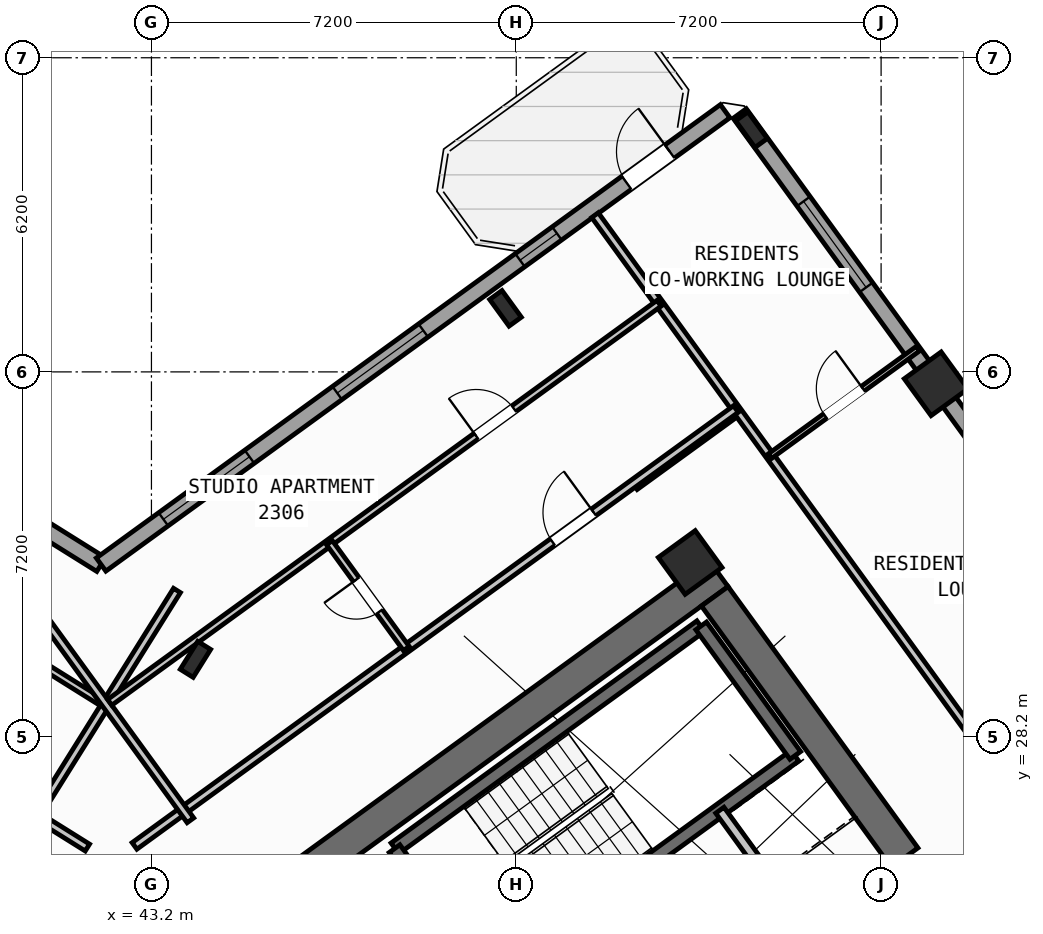
"""IFC4 building model, lengths in metres.
Left out: names, types, materials, properties, quantities, classifications, styles, units other than length and angle.
Written with IfcOpenShell. Run it as: python <this file> out.ifc"""

import sys

from ifc_helpers import new_model, si_unit, direction, frame, frame_2d, origin, origin_2d, place, context, subcontext, project, spatial, rectangle, hollow_rectangle, i_section, extrude, source, transform, mapped, element, fill, save


model = new_model("IFC4")
c1 = context("Model", 3, precision=1e-05, world=origin(), true_north=direction((0.0, 1.0)))
c2 = subcontext(c1, "Body", "Model", "MODEL_VIEW")
j1 = project(units=[si_unit("LENGTHUNIT", "METRE"), si_unit("PLANEANGLEUNIT", "RADIAN")], contexts=[c1])
p1 = place(None, origin())
s1 = spatial("IfcSite", under=j1, at=p1, CompositionType="ELEMENT")
p2 = place(p1, origin())
s2 = spatial("IfcBuilding", under=s1, at=p2, CompositionType="ELEMENT")
p3 = place(p2, frame((0.0, 0.0, 93.6)))
s3 = spatial("IfcBuildingStorey", under=s2, at=p3, CompositionType="ELEMENT", Elevation=93.6)
p4 = place(p3, frame((44.325, 24.113, 0.0), z_axis=(0.0, 0.0, 1.0), x_axis=(0.809012664862, 0.58779121131, 0.0)))
e1 = element("IfcWall", 1, at=p4, inside=s3, PredefinedType="SHEAR", context=c2, shape_type="SweptSolid", body=[
    extrude(rectangle(XDim=12.44, YDim=0.65, at=frame_2d((6.22, 0.0))), origin(), (0.0, 0.0, 1.0), 3.35),
])
p5 = place(p3, frame((58.064, 25.813, 0.0), z_axis=(0.0, 0.0, 1.0), x_axis=(-0.58777996584, 0.809020835181, 0.0)))
e2 = element("IfcWall", 2, at=p5, inside=s3, PredefinedType="SHEAR", context=c2, shape_type="SweptSolid", body=[
    extrude(rectangle(XDim=6.375, YDim=0.65, at=frame_2d((3.188, 0.0))), origin(), (0.0, 0.0, 1.0), 3.35),
])
m1 = source(origin(), c2, "Body", "SweptSolid", [
    extrude(i_section(OverallWidth=0.3, OverallDepth=0.65, WebThickness=0.016, FlangeThickness=0.031, at=origin_2d()), origin(), (0.0, 0.0, 1.0), 3.6),
])
p6 = place(p3, frame((44.068, 29.726, 0.0), z_axis=(0.0, 0.0, 1.0), x_axis=(-0.848048096156, 0.529919264233, 0.0)))
e3 = element("IfcColumn", 3, at=p6, inside=s3, PredefinedType="COLUMN", context=c2, shape_type="MappedRepresentation", body=[
    mapped(m1, transform((0.0, 0.0, 0.0), scale=1.0)),
])
m2 = source(origin(), c2, "Body", "SweptSolid", [
    extrude(hollow_rectangle(XDim=0.9, YDim=0.9, WallThickness=0.036, at=origin_2d()), origin(), (0.0, 0.0, 1.0), 3.6),
])
p7 = place(p3, frame((53.832, 31.638, 0.0), z_axis=(0.0, 0.0, 1.0), x_axis=(0.809016994375, 0.587785252292, 0.0)))
e4 = element("IfcColumn", 4, at=p7, inside=s3, PredefinedType="COLUMN", context=c2, shape_type="MappedRepresentation", body=[
    mapped(m2, transform((0.0, 0.0, 0.0), scale=1.0)),
])
p8 = place(p3, frame((50.188, 36.654, 0.0), z_axis=(0.0, 0.0, 1.0), x_axis=(0.809016994375, 0.587785252292, 0.0)))
e5 = element("IfcColumn", 5, at=p8, inside=s3, PredefinedType="COLUMN", context=c2, shape_type="MappedRepresentation", body=[
    mapped(m1, transform((0.0, 0.0, 0.0), scale=1.0)),
])
p9 = place(p3, frame((58.686, 35.165, 0.0), z_axis=(0.0, 0.0, 1.0), x_axis=(0.809016994375, 0.587785252292, 0.0)))
e6 = element("IfcColumn", 6, at=p9, inside=s3, PredefinedType="COLUMN", context=c2, shape_type="MappedRepresentation", body=[
    mapped(m2, transform((0.0, 0.0, 0.0), scale=1.0)),
])
p10 = place(p3, frame((55.042, 40.181, 0.0), z_axis=(0.0, 0.0, 1.0), x_axis=(0.809016994375, 0.587785252292, 0.0)))
e7 = element("IfcColumn", 7, at=p10, inside=s3, PredefinedType="COLUMN", context=c2, shape_type="MappedRepresentation", body=[
    mapped(m1, transform((0.0, 0.0, 0.0), scale=1.0)),
])
p11 = place(p3, frame((17.424, 47.083, 0.0), z_axis=(0.0, 0.0, 1.0), x_axis=(0.848049927979, -0.529916332693, 0.0)))
e8 = element("IfcWall", 8, at=p11, inside=s3, PredefinedType="STANDARD", context=c2, shape_type="SweptSolid", body=[
    extrude(rectangle(XDim=29.223, YDim=0.32, at=frame_2d((14.612, 0.0))), origin(), (0.0, 0.0, 1.0), 3.35),
])
p12 = place(p11, frame((3.745, 0.0, 0.0)))
e9 = element("IfcOpeningElement", 9, at=p12, cuts=e8, PredefinedType="OPENING", context=c2, shape_type="SweptSolid", body=[
    extrude(rectangle(XDim=1.05, YDim=2.15, at=frame_2d((0.525, 1.075))), frame((0.0, 0.17, 0.0), z_axis=(0.0, -1.0, 0.0), x_axis=(1.0, 0.0, 0.0)), (0.0, 0.0, 1.0), 0.34),
])
p13 = place(p11, frame((0.699, 0.0, 0.95)))
e10 = element("IfcOpeningElement", 10, at=p13, cuts=e8, PredefinedType="OPENING", context=c2, shape_type="SweptSolid", body=[
    extrude(rectangle(XDim=1.2, YDim=1.4, at=frame_2d((0.6, 0.7))), frame((0.0, 0.17, 0.0), z_axis=(0.0, -1.0, 0.0), x_axis=(1.0, 0.0, 0.0)), (0.0, 0.0, 1.0), 0.34),
])
p14 = place(p11, frame((6.951, 0.0, 1.0)))
e11 = element("IfcOpeningElement", 11, at=p14, cuts=e8, PredefinedType="OPENING", context=c2, shape_type="SweptSolid", body=[
    extrude(rectangle(XDim=0.9, YDim=1.25, at=frame_2d((0.45, 0.625))), frame((0.0, 0.17, 0.0), z_axis=(0.0, -1.0, 0.0), x_axis=(1.0, 0.0, 0.0)), (0.0, 0.0, 1.0), 0.34),
])
p15 = place(p11, frame((9.841, 0.0, 0.85)))
e12 = element("IfcOpeningElement", 12, at=p15, cuts=e8, PredefinedType="OPENING", context=c2, shape_type="SweptSolid", body=[
    extrude(rectangle(XDim=1.5, YDim=1.5, at=frame_2d((0.75, 0.75))), frame((0.0, 0.17, 0.0), z_axis=(0.0, -1.0, 0.0), x_axis=(1.0, 0.0, 0.0)), (0.0, 0.0, 1.0), 0.34),
])
p16 = place(p11, frame((13.889, 0.0, 0.95)))
e13 = element("IfcOpeningElement", 13, at=p16, cuts=e8, PredefinedType="OPENING", context=c2, shape_type="SweptSolid", body=[
    extrude(rectangle(XDim=1.2, YDim=1.4, at=frame_2d((0.6, 0.7))), frame((0.0, 0.17, 0.0), z_axis=(0.0, -1.0, 0.0), x_axis=(1.0, 0.0, 0.0)), (0.0, 0.0, 1.0), 0.34),
])
p17 = place(p11, frame((17.254, 0.0, 1.0)))
e14 = element("IfcOpeningElement", 14, at=p17, cuts=e8, PredefinedType="OPENING", context=c2, shape_type="SweptSolid", body=[
    extrude(rectangle(XDim=0.9, YDim=1.25, at=frame_2d((0.45, 0.625))), frame((0.0, 0.17, 0.0), z_axis=(0.0, -1.0, 0.0), x_axis=(1.0, 0.0, 0.0)), (0.0, 0.0, 1.0), 0.34),
])
p18 = place(p11, frame((20.764, 0.0, 0.8)))
e15 = element("IfcOpeningElement", 15, at=p18, cuts=e8, PredefinedType="OPENING", context=c2, shape_type="SweptSolid", body=[
    extrude(rectangle(XDim=2.1, YDim=1.55, at=frame_2d((1.05, 0.775))), frame((0.0, 0.17, 0.0), z_axis=(0.0, -1.0, 0.0), x_axis=(1.0, 0.0, 0.0)), (0.0, 0.0, 1.0), 0.34),
])
p19 = place(p11, frame((25.403, 0.0, 0.8)))
e16 = element("IfcOpeningElement", 16, at=p19, cuts=e8, PredefinedType="OPENING", context=c2, shape_type="SweptSolid", body=[
    extrude(rectangle(XDim=2.1, YDim=1.55, at=frame_2d((1.05, 0.775))), frame((0.0, 0.17, 0.0), z_axis=(0.0, -1.0, 0.0), x_axis=(1.0, 0.0, 0.0)), (0.0, 0.0, 1.0), 0.34),
])
p20 = place(p3, frame((42.207, 31.597, 0.0), z_axis=(0.0, 0.0, 1.0), x_axis=(0.809020333377, 0.587780656523, 0.0)))
e17 = element("IfcWall", 17, at=p20, inside=s3, PredefinedType="STANDARD", context=c2, shape_type="SweptSolid", body=[
    extrude(rectangle(XDim=15.223, YDim=0.32, at=frame_2d((7.611, 0.0))), origin(), (0.0, 0.0, 1.0), 3.35),
])
p21 = place(p20, frame((12.82, 0.0, 0.0)))
e18 = element("IfcOpeningElement", 18, at=p21, cuts=e17, PredefinedType="OPENING", context=c2, shape_type="SweptSolid", body=[
    extrude(rectangle(XDim=1.05, YDim=2.15, at=frame_2d((0.525, 1.075))), frame((0.0, 0.17, 0.0), z_axis=(0.0, -1.0, 0.0), x_axis=(1.0, 0.0, 0.0)), (0.0, 0.0, 1.0), 0.34),
])
p22 = place(p20, frame((1.52, 0.0, 0.8)))
e19 = element("IfcOpeningElement", 19, at=p22, cuts=e17, PredefinedType="OPENING", context=c2, shape_type="SweptSolid", body=[
    extrude(rectangle(XDim=2.1, YDim=1.55, at=frame_2d((1.05, 0.775))), frame((0.0, 0.17, 0.0), z_axis=(0.0, -1.0, 0.0), x_axis=(1.0, 0.0, 0.0)), (0.0, 0.0, 1.0), 0.34),
])
p23 = place(p20, frame((5.76, 0.0, 0.8)))
e20 = element("IfcOpeningElement", 20, at=p23, cuts=e17, PredefinedType="OPENING", context=c2, shape_type="SweptSolid", body=[
    extrude(rectangle(XDim=2.1, YDim=1.55, at=frame_2d((1.05, 0.775))), frame((0.0, 0.17, 0.0), z_axis=(0.0, -1.0, 0.0), x_axis=(1.0, 0.0, 0.0)), (0.0, 0.0, 1.0), 0.34),
])
p24 = place(p20, frame((10.219, 0.0, 1.0)))
e21 = element("IfcOpeningElement", 21, at=p24, cuts=e17, PredefinedType="OPENING", context=c2, shape_type="SweptSolid", body=[
    extrude(rectangle(XDim=0.9, YDim=1.25, at=frame_2d((0.45, 0.625))), frame((0.0, 0.17, 0.0), z_axis=(0.0, -1.0, 0.0), x_axis=(1.0, 0.0, 0.0)), (0.0, 0.0, 1.0), 0.34),
])
p25 = place(p3, frame((54.81, 40.5, 0.0), z_axis=(0.0, 0.0, 1.0), x_axis=(0.587783625747, -0.809018176127, 0.0)))
e22 = element("IfcWall", 22, at=p25, inside=s3, PredefinedType="STANDARD", context=c2, shape_type="SweptSolid", body=[
    extrude(rectangle(XDim=21.587, YDim=0.32, at=frame_2d((10.794, 0.0))), origin(), (0.0, 0.0, 1.0), 2.775),
])
p26 = place(p25, frame((2.143, 0.0, 0.8)))
e23 = element("IfcOpeningElement", 23, at=p26, cuts=e22, PredefinedType="OPENING", context=c2, shape_type="SweptSolid", body=[
    extrude(rectangle(XDim=2.1, YDim=1.55, at=frame_2d((1.05, 0.775))), frame((0.0, 0.17, 0.0), z_axis=(0.0, -1.0, 0.0), x_axis=(1.0, 0.0, 0.0)), (0.0, 0.0, 1.0), 0.34),
])
p27 = place(p25, frame((9.344, 0.0, 0.85)))
e24 = element("IfcOpeningElement", 24, at=p27, cuts=e22, PredefinedType="OPENING", context=c2, shape_type="SweptSolid", body=[
    extrude(rectangle(XDim=1.8, YDim=1.5, at=frame_2d((0.9, 0.75))), frame((0.0, 0.17, 0.0), z_axis=(0.0, -1.0, 0.0), x_axis=(1.0, 0.0, 0.0)), (0.0, 0.0, 1.0), 0.34),
])
p28 = place(p25, frame((18.309, 0.0, 0.85)))
e25 = element("IfcOpeningElement", 25, at=p28, cuts=e22, PredefinedType="OPENING", context=c2, shape_type="SweptSolid", body=[
    extrude(rectangle(XDim=1.5, YDim=1.5, at=frame_2d((0.75, 0.75))), frame((0.0, 0.17, 0.0), z_axis=(0.0, -1.0, 0.0), x_axis=(1.0, 0.0, 0.0)), (0.0, 0.0, 1.0), 0.34),
])
p29 = place(p3, frame((48.006, 25.996, 0.0), z_axis=(0.0, 0.0, 1.0), x_axis=(0.80901903764, 0.587782439969, 0.0)))
e26 = element("IfcWall", 26, at=p29, inside=s3, PredefinedType="SHEAR", context=c2, shape_type="SweptSolid", body=[
    extrude(rectangle(XDim=7.46, YDim=0.26, at=frame_2d((3.73, 0.0))), origin(), (0.0, 0.0, 1.0), 3.35),
])
p30 = place(p3, frame((49.863, 23.44, 0.0), z_axis=(0.0, 0.0, 1.0), x_axis=(0.809003474932, 0.587803859759, 0.0)))
e27 = element("IfcWall", 27, at=p30, inside=s3, PredefinedType="SHEAR", context=c2, shape_type="SweptSolid", body=[
    extrude(rectangle(XDim=7.46, YDim=0.26, at=frame_2d((3.73, 0.0))), origin(), (0.0, 0.0, 1.0), 3.35),
])
p31 = place(p30, frame((0.36, 0.0, 0.0)))
e28 = element("IfcOpeningElement", 28, at=p31, cuts=e27, PredefinedType="OPENING", context=c2, shape_type="SweptSolid", body=[
    extrude(rectangle(XDim=0.86, YDim=2.05, at=frame_2d((0.43, 1.025))), frame((0.0, 0.14, 0.0), z_axis=(0.0, -1.0, 0.0), x_axis=(1.0, 0.0, 0.0)), (0.0, 0.0, 1.0), 0.28),
])
p32 = place(p3, frame((49.855, 23.434, 0.0), z_axis=(0.0, 0.0, 1.0), x_axis=(-0.58776738483, 0.809029975545, 0.0)))
e29 = element("IfcWall", 29, at=p32, inside=s3, PredefinedType="SHEAR", context=c2, shape_type="SweptSolid", body=[
    extrude(rectangle(XDim=3.16, YDim=0.26, at=frame_2d((1.58, 0.0))), origin(), (0.0, 0.0, 1.0), 3.35),
])
p33 = place(p3, frame((55.906, 27.831, 0.0), z_axis=(0.0, 0.0, 1.0), x_axis=(-0.587804123638, 0.809003283204, 0.0)))
e30 = element("IfcWall", 30, at=p33, inside=s3, PredefinedType="SHEAR", context=c2, shape_type="SweptSolid", body=[
    extrude(rectangle(XDim=3.16, YDim=0.26, at=frame_2d((1.58, 0.0))), origin(), (0.0, 0.0, 1.0), 3.35),
])
p34 = place(p3, frame((56.111, 24.419, 0.0), z_axis=(0.0, 0.0, 1.0), x_axis=(-0.58777848983, 0.809021907548, 0.0)))
e31 = element("IfcWall", 31, at=p34, inside=s3, PredefinedType="STANDARD", context=c2, shape_type="SweptSolid", body=[
    extrude(rectangle(XDim=2.88, YDim=0.2, at=frame_2d((1.44, 0.0))), origin(), (0.0, 0.0, 1.0), 3.34),
])
p35 = place(p3, frame((41.936, 26.012, 0.0), z_axis=(0.0, 0.0, 1.0), x_axis=(-0.848051154596, 0.529914369676, 0.0)))
e32 = element("IfcWall", 32, at=p35, inside=s3, PredefinedType="PARTITIONING", context=c2, shape_type="SweptSolid", body=[
    extrude(rectangle(XDim=15.57, YDim=0.16, at=frame_2d((7.785, 0.0))), origin(), (0.0, 0.0, 1.0), 3.34),
])
p36 = place(p35, frame((10.83, 0.0, 0.0)))
e33 = element("IfcOpeningElement", 33, at=p36, cuts=e32, PredefinedType="OPENING", context=c2, shape_type="SweptSolid", body=[
    extrude(rectangle(XDim=1.0, YDim=2.1, at=frame_2d((0.5, 1.05))), frame((0.0, 0.09, 0.0), z_axis=(0.0, -1.0, 0.0), x_axis=(1.0, 0.0, 0.0)), (0.0, 0.0, 1.0), 0.18),
])
p37 = place(p3, frame((43.704, 31.086, 0.0), z_axis=(0.0, 0.0, 1.0), x_axis=(-0.529906828443, -0.848055866774, 0.0)))
e34 = element("IfcWall", 34, at=p37, inside=s3, PredefinedType="PARTITIONING", context=c2, shape_type="SweptSolid", body=[
    extrude(rectangle(XDim=5.48, YDim=0.16, at=frame_2d((2.74, 0.0))), origin(), (0.0, 0.0, 1.0), 3.34),
])
p38 = place(p3, frame((42.226, 28.873, 0.0), z_axis=(0.0, 0.0, 1.0), x_axis=(-0.848049134363, 0.529917602752, 0.0)))
e35 = element("IfcWall", 35, at=p38, inside=s3, PredefinedType="PLUMBINGWALL", context=c2, shape_type="SweptSolid", body=[
    extrude(rectangle(XDim=14.3, YDim=0.14, at=frame_2d((7.15, 0.0))), origin(), (0.0, 0.0, 1.0), 3.34),
])
p39 = place(p38, frame((9.57, 0.0, 0.0)))
e36 = element("IfcOpeningElement", 36, at=p39, cuts=e35, PredefinedType="OPENING", context=c2, shape_type="SweptSolid", body=[
    extrude(rectangle(XDim=0.92, YDim=2.08, at=frame_2d((0.46, 1.04))), frame((0.0, 0.08, 0.0), z_axis=(0.0, -1.0, 0.0), x_axis=(1.0, 0.0, 0.0)), (0.0, 0.0, 1.0), 0.16),
])
p40 = place(p3, frame((52.739, 33.143, 0.0), z_axis=(0.0, 0.0, 1.0), x_axis=(0.809000999347, 0.58780726693, 0.0)))
e37 = element("IfcWall", 37, at=p40, inside=s3, PredefinedType="PARTITIONING", context=c2, shape_type="SweptSolid", body=[
    extrude(rectangle(XDim=2.51, YDim=0.16, at=frame_2d((1.255, 0.0))), origin(), (0.0, 0.0, 1.0), 3.34),
])
p41 = place(p3, frame((60.829, 26.278, 0.0), z_axis=(0.0, 0.0, 1.0), x_axis=(-0.587777474174, 0.809022645451, 0.0)))
e38 = element("IfcWall", 38, at=p41, inside=s3, PredefinedType="PARTITIONING", context=c2, shape_type="SweptSolid", body=[
    extrude(rectangle(XDim=15.1, YDim=0.16, at=frame_2d((7.55, 0.0))), origin(), (0.0, 0.0, 1.0), 3.34),
])
p42 = place(p3, frame((55.409, 33.738, 0.0), z_axis=(0.0, 0.0, 1.0), x_axis=(0.809005039917, 0.58780170584, 0.0)))
e39 = element("IfcWall", 39, at=p42, inside=s3, PredefinedType="PARTITIONING", context=c2, shape_type="SweptSolid", body=[
    extrude(rectangle(XDim=3.61, YDim=0.11, at=frame_2d((1.805, 0.0))), origin(), (0.0, 0.0, 1.0), 3.34),
])
p43 = place(p42, frame((1.345, 0.0, 0.0)))
e40 = element("IfcOpeningElement", 40, at=p43, cuts=e39, PredefinedType="OPENING", context=c2, shape_type="SweptSolid", body=[
    extrude(rectangle(XDim=0.92, YDim=2.08, at=frame_2d((0.46, 1.04))), frame((0.0, 0.065, 0.0), z_axis=(0.0, -1.0, 0.0), x_axis=(1.0, 0.0, 0.0)), (0.0, 0.0, 1.0), 0.13),
])
p44 = place(p3, frame((42.866, 26.044, 0.0), z_axis=(0.0, 0.0, 1.0), x_axis=(0.809020254154, 0.587780765566, 0.0)))
e41 = element("IfcWall", 41, at=p44, inside=s3, PredefinedType="PARTITIONING", context=c2, shape_type="SweptSolid", body=[
    extrude(rectangle(XDim=14.67, YDim=0.16, at=frame_2d((7.335, 0.0))), origin(), (0.0, 0.0, 1.0), 3.34),
])
p45 = place(p44, frame((10.2, 0.0, 0.0)))
e42 = element("IfcOpeningElement", 42, at=p45, cuts=e41, PredefinedType="OPENING", context=c2, shape_type="SweptSolid", body=[
    extrude(rectangle(XDim=1.0, YDim=2.1, at=frame_2d((0.5, 1.05))), frame((0.0, 0.09, 0.0), z_axis=(0.0, -1.0, 0.0), x_axis=(1.0, 0.0, 0.0)), (0.0, 0.0, 1.0), 0.18),
])
p46 = place(p3, frame((43.969, 26.55, 0.0), z_axis=(0.0, 0.0, 1.0), x_axis=(-0.587776919386, 0.80902304852, 0.0)))
e43 = element("IfcWall", 43, at=p46, inside=s3, PredefinedType="PARTITIONING", context=c2, shape_type="SweptSolid", body=[
    extrude(rectangle(XDim=5.48, YDim=0.16, at=frame_2d((2.74, 0.0))), origin(), (0.0, 0.0, 1.0), 3.34),
])
p47 = place(p3, frame((42.377, 28.878, 0.0), z_axis=(0.0, 0.0, 1.0), x_axis=(0.809020411523, 0.587780548963, 0.0)))
e44 = element("IfcWall", 44, at=p47, inside=s3, PredefinedType="PLUMBINGWALL", context=c2, shape_type="SweptSolid", body=[
    extrude(rectangle(XDim=13.4, YDim=0.14, at=frame_2d((6.7, 0.0))), origin(), (0.0, 0.0, 1.0), 3.34),
])
p48 = place(p47, frame((8.94, 0.0, 0.0)))
e45 = element("IfcOpeningElement", 45, at=p48, cuts=e44, PredefinedType="OPENING", context=c2, shape_type="SweptSolid", body=[
    extrude(rectangle(XDim=0.92, YDim=2.08, at=frame_2d((0.46, 1.04))), frame((0.0, 0.08, 0.0), z_axis=(0.0, -1.0, 0.0), x_axis=(1.0, 0.0, 0.0)), (0.0, 0.0, 1.0), 0.16),
])
p49 = place(p3, frame((48.229, 29.941, 0.0), z_axis=(0.0, 0.0, 1.0), x_axis=(-0.587772116736, 0.809026537752, 0.0)))
e46 = element("IfcWall", 46, at=p49, inside=s3, PredefinedType="PLUMBINGWALL", context=c2, shape_type="SweptSolid", body=[
    extrude(rectangle(XDim=2.58, YDim=0.14, at=frame_2d((1.29, 0.0))), origin(), (0.0, 0.0, 1.0), 3.34),
])
p50 = place(p49, frame((0.9, 0.0, 0.0)))
e47 = element("IfcOpeningElement", 47, at=p50, cuts=e46, PredefinedType="OPENING", context=c2, shape_type="SweptSolid", body=[
    extrude(rectangle(XDim=0.78, YDim=2.05, at=frame_2d((0.39, 1.025))), frame((0.0, 0.08, 0.0), z_axis=(0.0, -1.0, 0.0), x_axis=(1.0, 0.0, 0.0)), (0.0, 0.0, 1.0), 0.16),
])
m3 = source(origin(), c2, "Body", "SweptSolid", [
    extrude(rectangle(XDim=1.05, YDim=2.15, at=frame_2d((0.525, 1.075))), frame((0.0, 0.025, 0.0), z_axis=(0.0, -1.0, 0.0), x_axis=(1.0, 0.0, 0.0)), (0.0, 0.0, 1.0), 0.05),
])
p51 = place(p21, origin())
e48 = element("IfcDoor", 48, at=p51, inside=s3, OperationType="SINGLE_SWING_RIGHT", PredefinedType="DOOR", context=c2, shape_type="MappedRepresentation", body=[
    mapped(m3, transform((0.0, 0.0, 0.0), scale=1.0)),
])
fill(e18, e48)
m4 = source(origin(), c2, "Body", "SweptSolid", [
    extrude(rectangle(XDim=2.1, YDim=1.55, at=frame_2d((1.05, 0.775))), frame((0.0, 0.03, 0.0), z_axis=(0.0, -1.0, 0.0), x_axis=(1.0, 0.0, 0.0)), (0.0, 0.0, 1.0), 0.06),
])
p52 = place(p22, origin())
e49 = element("IfcWindow", 49, at=p52, inside=s3, PartitioningType="SINGLE_PANEL", PredefinedType="WINDOW", context=c2, shape_type="MappedRepresentation", body=[
    mapped(m4, transform((0.0, 0.0, 0.0), scale=1.0)),
])
fill(e19, e49)
p53 = place(p23, origin())
e50 = element("IfcWindow", 50, at=p53, inside=s3, PartitioningType="SINGLE_PANEL", PredefinedType="WINDOW", context=c2, shape_type="MappedRepresentation", body=[
    mapped(m4, transform((0.0, 0.0, 0.0), scale=1.0)),
])
fill(e20, e50)
m5 = source(origin(), c2, "Body", "SweptSolid", [
    extrude(rectangle(XDim=0.9, YDim=1.25, at=frame_2d((0.45, 0.625))), frame((0.0, 0.03, 0.0), z_axis=(0.0, -1.0, 0.0), x_axis=(1.0, 0.0, 0.0)), (0.0, 0.0, 1.0), 0.06),
])
p54 = place(p24, origin())
e51 = element("IfcWindow", 51, at=p54, inside=s3, PartitioningType="SINGLE_PANEL", PredefinedType="WINDOW", context=c2, shape_type="MappedRepresentation", body=[
    mapped(m5, transform((0.0, 0.0, 0.0), scale=1.0)),
])
fill(e21, e51)
p55 = place(p26, origin())
e52 = element("IfcWindow", 52, at=p55, inside=s3, PartitioningType="SINGLE_PANEL", PredefinedType="WINDOW", context=c2, shape_type="MappedRepresentation", body=[
    mapped(m4, transform((0.0, 0.0, 0.0), scale=1.0)),
])
fill(e23, e52)
m6 = source(origin(), c2, "Body", "SweptSolid", [
    extrude(rectangle(XDim=0.92, YDim=2.08, at=frame_2d((0.46, 1.04))), frame((0.0, 0.025, 0.0), z_axis=(0.0, -1.0, 0.0), x_axis=(1.0, 0.0, 0.0)), (0.0, 0.0, 1.0), 0.05),
])
p56 = place(p43, origin())
e53 = element("IfcDoor", 53, at=p56, inside=s3, OperationType="SINGLE_SWING_RIGHT", PredefinedType="DOOR", context=c2, shape_type="MappedRepresentation", body=[
    mapped(m6, transform((0.0, 0.0, 0.0), scale=1.0)),
])
fill(e40, e53)
m7 = source(origin(), c2, "Body", "SweptSolid", [
    extrude(rectangle(XDim=1.0, YDim=2.1, at=frame_2d((0.5, 1.05))), frame((0.0, 0.025, 0.0), z_axis=(0.0, -1.0, 0.0), x_axis=(1.0, 0.0, 0.0)), (0.0, 0.0, 1.0), 0.05),
])
p57 = place(p45, origin())
e54 = element("IfcDoor", 54, at=p57, inside=s3, OperationType="SINGLE_SWING_RIGHT", PredefinedType="DOOR", context=c2, shape_type="MappedRepresentation", body=[
    mapped(m7, transform((0.0, 0.0, 0.0), scale=1.0)),
])
fill(e42, e54)
p58 = place(p48, origin())
e55 = element("IfcDoor", 55, at=p58, inside=s3, OperationType="SINGLE_SWING_LEFT", PredefinedType="DOOR", context=c2, shape_type="MappedRepresentation", body=[
    mapped(m6, transform((0.0, 0.0, 0.0), scale=1.0)),
])
fill(e45, e55)
m8 = source(origin(), c2, "Body", "SweptSolid", [
    extrude(rectangle(XDim=0.78, YDim=2.05, at=frame_2d((0.39, 1.025))), frame((0.0, 0.025, 0.0), z_axis=(0.0, -1.0, 0.0), x_axis=(1.0, 0.0, 0.0)), (0.0, 0.0, 1.0), 0.05),
])
p59 = place(p50, origin())
e56 = element("IfcDoor", 56, at=p59, inside=s3, OperationType="SINGLE_SWING_RIGHT", PredefinedType="DOOR", context=c2, shape_type="MappedRepresentation", body=[
    mapped(m8, transform((0.0, 0.0, 0.0), scale=1.0)),
])
fill(e47, e56)
save(model, sys.argv[1])
